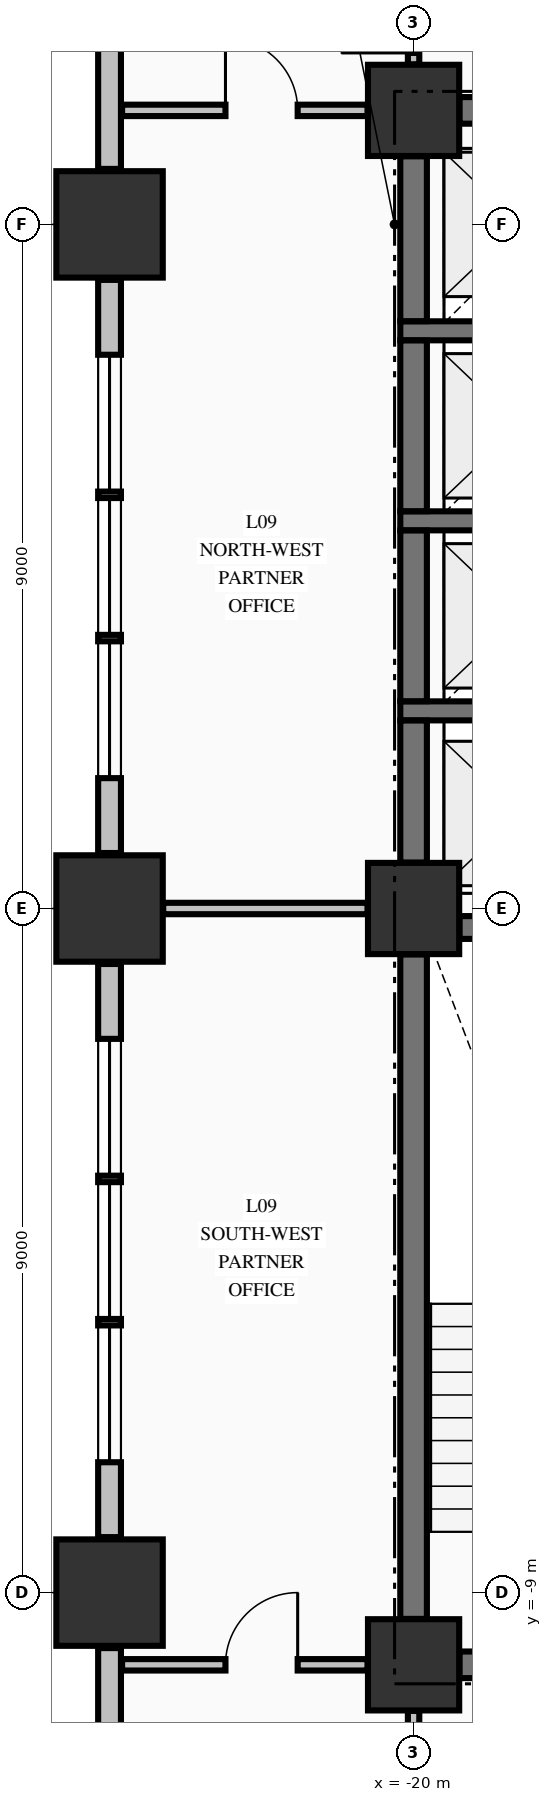
"""IFC4 building model, lengths in metres.
Left out: names, types, materials, properties, quantities, classifications, styles, units other than length and angle.
Written with IfcOpenShell. Run it as: python <this file> out.ifc"""

import sys

from ifc_helpers import new_model, si_unit, direction, frame, frame_2d, origin, origin_2d, place, context, subcontext, project, spatial, rectangle, extrude, element, fill, save


model = new_model("IFC4")
c1 = context("Model", 3, precision=1e-05, world=origin(), true_north=direction((0.0, 1.0)))
c2 = subcontext(c1, "Body", "Model", "MODEL_VIEW")
j1 = project(units=[si_unit("LENGTHUNIT", "METRE"), si_unit("PLANEANGLEUNIT", "RADIAN")], contexts=[c1])
p1 = place(None, origin())
s1 = spatial("IfcSite", under=j1, at=p1, CompositionType="ELEMENT")
p2 = place(p1, origin())
s2 = spatial("IfcBuilding", under=s1, at=p2, CompositionType="ELEMENT")
p3 = place(p2, frame((0.0, 0.0, 41.48)))
s3 = spatial("IfcBuildingStorey", under=s2, at=p3, CompositionType="ELEMENT", Elevation=41.48)
for number, where, z_axis, x_axis in (
    (1, (-24.0, -9.0, -0.25), (0.0, 0.0, 1.0), (1.0, 0.0, 0.0)),
    (2, (-24.0, 0.0, -0.25), (0.0, 0.0, 1.0), (1.0, 0.0, 0.0)),
    (3, (-24.0, 9.0, -0.25), (0.0, 0.0, 1.0), (1.0, 0.0, 0.0)),
):
    element("IfcColumn", number, at=place(p3, frame(where, z_axis=z_axis, x_axis=x_axis)), inside=s3, PredefinedType="COLUMN", context=c2, shape_type="SweptSolid", body=[
        extrude(rectangle(XDim=1.4, YDim=1.4, at=origin_2d()), origin(), (0.0, 0.0, 1.0), 3.57),
    ])
for number, where, z_axis, x_axis in (
    (4, (-20.0, -9.95, -0.25), (0.0, 0.0, 1.0), (1.0, 0.0, 0.0)),
    (5, (-20.0, 10.5, -0.25), (0.0, 0.0, 1.0), (1.0, 0.0, 0.0)),
    (6, (-20.0, 0.0, -0.25), (0.0, 0.0, 1.0), (1.0, 0.0, 0.0)),
):
    element("IfcColumn", number, at=place(p3, frame(where, z_axis=z_axis, x_axis=x_axis)), inside=s3, PredefinedType="COLUMN", context=c2, shape_type="SweptSolid", body=[
        extrude(rectangle(XDim=1.2, YDim=1.2, at=origin_2d()), origin(), (0.0, 0.0, 1.0), 3.57),
    ])
p4 = place(p3, frame((-24.0, -9.73, 0.0), z_axis=(0.0, 0.0, 1.0), x_axis=(0.0, -1.0, 0.0)))
e7 = element("IfcWall", 7, at=p4, inside=s3, PredefinedType="STANDARD", context=c2, shape_type="SweptSolid", body=[
    extrude(rectangle(XDim=12.54, YDim=0.3, at=frame_2d((6.27, 0.0))), origin(), (0.0, 0.0, 1.0), 2.712),
])
p5 = place(p3, frame((-24.0, -0.73, 0.0), z_axis=(0.0, 0.0, 1.0), x_axis=(0.0, -1.0, 0.0)))
e8 = element("IfcWall", 8, at=p5, inside=s3, PredefinedType="STANDARD", context=c2, shape_type="SweptSolid", body=[
    extrude(rectangle(XDim=7.54, YDim=0.3, at=frame_2d((3.77, 0.0))), origin(), (0.0, 0.0, 1.0), 2.712),
])
p6 = place(p5, frame((0.985, 0.0, 0.78)))
e9 = element("IfcOpeningElement", 9, at=p6, cuts=e8, PredefinedType="OPENING", context=c2, shape_type="SweptSolid", body=[
    extrude(rectangle(XDim=1.8, YDim=1.72, at=frame_2d((0.9, 0.86))), frame((0.0, 0.16, 0.0), z_axis=(0.0, -1.0, 0.0), x_axis=(1.0, 0.0, 0.0)), (0.0, 0.0, 1.0), 0.32),
])
p7 = place(p5, frame((2.87, 0.0, 0.78)))
e10 = element("IfcOpeningElement", 10, at=p7, cuts=e8, PredefinedType="OPENING", context=c2, shape_type="SweptSolid", body=[
    extrude(rectangle(XDim=1.8, YDim=1.72, at=frame_2d((0.9, 0.86))), frame((0.0, 0.16, 0.0), z_axis=(0.0, -1.0, 0.0), x_axis=(1.0, 0.0, 0.0)), (0.0, 0.0, 1.0), 0.32),
])
p8 = place(p5, frame((4.755, 0.0, 0.78)))
e11 = element("IfcOpeningElement", 11, at=p8, cuts=e8, PredefinedType="OPENING", context=c2, shape_type="SweptSolid", body=[
    extrude(rectangle(XDim=1.8, YDim=1.72, at=frame_2d((0.9, 0.86))), frame((0.0, 0.16, 0.0), z_axis=(0.0, -1.0, 0.0), x_axis=(1.0, 0.0, 0.0)), (0.0, 0.0, 1.0), 0.32),
])
p9 = place(p3, frame((-24.0, 8.27, 0.0), z_axis=(0.0, 0.0, 1.0), x_axis=(0.0, -1.0, 0.0)))
e12 = element("IfcWall", 12, at=p9, inside=s3, PredefinedType="STANDARD", context=c2, shape_type="SweptSolid", body=[
    extrude(rectangle(XDim=7.54, YDim=0.3, at=frame_2d((3.77, 0.0))), origin(), (0.0, 0.0, 1.0), 2.712),
])
p10 = place(p9, frame((0.985, 0.0, 0.78)))
e13 = element("IfcOpeningElement", 13, at=p10, cuts=e12, PredefinedType="OPENING", context=c2, shape_type="SweptSolid", body=[
    extrude(rectangle(XDim=1.8, YDim=1.72, at=frame_2d((0.9, 0.86))), frame((0.0, 0.16, 0.0), z_axis=(0.0, -1.0, 0.0), x_axis=(1.0, 0.0, 0.0)), (0.0, 0.0, 1.0), 0.32),
])
p11 = place(p9, frame((2.87, 0.0, 0.78)))
e14 = element("IfcOpeningElement", 14, at=p11, cuts=e12, PredefinedType="OPENING", context=c2, shape_type="SweptSolid", body=[
    extrude(rectangle(XDim=1.8, YDim=1.72, at=frame_2d((0.9, 0.86))), frame((0.0, 0.16, 0.0), z_axis=(0.0, -1.0, 0.0), x_axis=(1.0, 0.0, 0.0)), (0.0, 0.0, 1.0), 0.32),
])
p12 = place(p9, frame((4.755, 0.0, 0.78)))
e15 = element("IfcOpeningElement", 15, at=p12, cuts=e12, PredefinedType="OPENING", context=c2, shape_type="SweptSolid", body=[
    extrude(rectangle(XDim=1.8, YDim=1.72, at=frame_2d((0.9, 0.86))), frame((0.0, 0.16, 0.0), z_axis=(0.0, -1.0, 0.0), x_axis=(1.0, 0.0, 0.0)), (0.0, 0.0, 1.0), 0.32),
])
p13 = place(p3, frame((-24.0, 22.27, 0.0), z_axis=(0.0, 0.0, 1.0), x_axis=(0.0, -1.0, 0.0)))
e16 = element("IfcWall", 16, at=p13, inside=s3, PredefinedType="STANDARD", context=c2, shape_type="SweptSolid", body=[
    extrude(rectangle(XDim=12.54, YDim=0.3, at=frame_2d((6.27, 0.0))), origin(), (0.0, 0.0, 1.0), 2.712),
])
p14 = place(p3, frame((-19.396, -9.95, 0.0), z_axis=(0.0, 0.0, 1.0), x_axis=(1.0, 0.0, 0.0)))
e17 = element("IfcWall", 17, at=p14, inside=s3, PredefinedType="SHEAR", context=c2, shape_type="SweptSolid", body=[
    extrude(rectangle(XDim=4.696, YDim=0.35, at=frame_2d((2.348, 0.0))), origin(), (0.0, 0.0, 1.0), 3.32),
])
p15 = place(p14, frame((0.571, 0.0, 0.0)))
e18 = element("IfcOpeningElement", 18, at=p15, cuts=e17, PredefinedType="OPENING", context=c2, shape_type="SweptSolid", body=[
    extrude(rectangle(XDim=1.05, YDim=2.15, at=frame_2d((0.525, 1.075))), frame((0.0, 0.185, 0.0), z_axis=(0.0, -1.0, 0.0), x_axis=(1.0, 0.0, 0.0)), (0.0, 0.0, 1.0), 0.37),
])
p16 = place(p3, frame((-19.396, -0.25, 0.0), z_axis=(0.0, 0.0, 1.0), x_axis=(1.0, 0.0, 0.0)))
e19 = element("IfcWall", 19, at=p16, inside=s3, PredefinedType="SHEAR", context=c2, shape_type="SweptSolid", body=[
    extrude(rectangle(XDim=7.792, YDim=0.3, at=frame_2d((3.896, 0.0))), origin(), (0.0, 0.0, 1.0), 3.32),
])
p17 = place(p16, frame((5.696, 0.0, 0.0)))
e20 = element("IfcOpeningElement", 20, at=p17, cuts=e19, PredefinedType="OPENING", context=c2, shape_type="SweptSolid", body=[
    extrude(rectangle(XDim=1.1, YDim=2.15, at=frame_2d((0.55, 1.075))), frame((0.0, 0.16, 0.0), z_axis=(0.0, -1.0, 0.0), x_axis=(1.0, 0.0, 0.0)), (0.0, 0.0, 1.0), 0.32),
])
for number, where, z_axis, x_axis in (
    (21, (-20.175, 2.6, 0.0), (0.0, 0.0, 1.0), (1.0, 0.0, 0.0)),
    (22, (-20.175, 5.1, 0.0), (0.0, 0.0, 1.0), (1.0, 0.0, 0.0)),
    (23, (-20.175, 7.6, 0.0), (0.0, 0.0, 1.0), (1.0, 0.0, 0.0)),
):
    element("IfcWall", number, at=place(p3, frame(where, z_axis=z_axis, x_axis=x_axis)), inside=s3, PredefinedType="SOLIDWALL", context=c2, shape_type="SweptSolid", body=[
        extrude(rectangle(XDim=3.1, YDim=0.25, at=frame_2d((1.55, 0.0))), origin(), (0.0, 0.0, 1.0), 3.32),
    ])
p18 = place(p3, frame((-19.396, 10.5, 0.0), z_axis=(0.0, 0.0, 1.0), x_axis=(1.0, 0.0, 0.0)))
e24 = element("IfcWall", 24, at=p18, inside=s3, PredefinedType="SHEAR", context=c2, shape_type="SweptSolid", body=[
    extrude(rectangle(XDim=4.696, YDim=0.35, at=frame_2d((2.348, 0.0))), origin(), (0.0, 0.0, 1.0), 3.32),
])
p19 = place(p18, frame((2.796, 0.0, 0.0)))
e25 = element("IfcOpeningElement", 25, at=p19, cuts=e24, PredefinedType="OPENING", context=c2, shape_type="SweptSolid", body=[
    extrude(rectangle(XDim=1.2, YDim=2.15, at=frame_2d((0.6, 1.075))), frame((0.0, 0.185, 0.0), z_axis=(0.0, -1.0, 0.0), x_axis=(1.0, 0.0, 0.0)), (0.0, 0.0, 1.0), 0.37),
])
p20 = place(p3, frame((-23.835, -9.95, 0.0), z_axis=(0.0, 0.0, 1.0), x_axis=(1.0, 0.0, 0.0)))
e26 = element("IfcWall", 26, at=p20, inside=s3, PredefinedType="PARTITIONING", context=c2, shape_type="SweptSolid", body=[
    extrude(rectangle(XDim=3.229, YDim=0.15, at=frame_2d((1.615, 0.0))), origin(), (0.0, 0.0, 1.0), 3.32),
])
p21 = place(p20, frame((1.36, 0.0, 0.0)))
e27 = element("IfcOpeningElement", 27, at=p21, cuts=e26, PredefinedType="OPENING", context=c2, shape_type="SweptSolid", body=[
    extrude(rectangle(XDim=0.95, YDim=2.15, at=frame_2d((0.475, 1.075))), frame((0.0, 0.085, 0.0), z_axis=(0.0, -1.0, 0.0), x_axis=(1.0, 0.0, 0.0)), (0.0, 0.0, 1.0), 0.17),
])
p22 = place(p3, frame((-23.294, 0.0, 0.0), z_axis=(0.0, 0.0, 1.0), x_axis=(1.0, 0.0, 0.0)))
e28 = element("IfcWall", 28, at=p22, inside=s3, PredefinedType="PARTITIONING", context=c2, shape_type="SweptSolid", body=[
    extrude(rectangle(XDim=2.688, YDim=0.15, at=frame_2d((1.344, 0.0))), origin(), (0.0, 0.0, 1.0), 2.66),
])
p23 = place(p3, frame((-23.835, 10.5, 0.0), z_axis=(0.0, 0.0, 1.0), x_axis=(1.0, 0.0, 0.0)))
e29 = element("IfcWall", 29, at=p23, inside=s3, PredefinedType="PARTITIONING", context=c2, shape_type="SweptSolid", body=[
    extrude(rectangle(XDim=3.229, YDim=0.15, at=frame_2d((1.615, 0.0))), origin(), (0.0, 0.0, 1.0), 3.32),
])
p24 = place(p23, frame((1.36, 0.0, 0.0)))
e30 = element("IfcOpeningElement", 30, at=p24, cuts=e29, PredefinedType="OPENING", context=c2, shape_type="SweptSolid", body=[
    extrude(rectangle(XDim=0.95, YDim=2.15, at=frame_2d((0.475, 1.075))), frame((0.0, 0.085, 0.0), z_axis=(0.0, -1.0, 0.0), x_axis=(1.0, 0.0, 0.0)), (0.0, 0.0, 1.0), 0.17),
])
p25 = place(p3, frame((-20.0, -9.346, 0.0), z_axis=(0.0, 0.0, 1.0), x_axis=(0.0, 1.0, 0.0)))
e31 = element("IfcWall", 31, at=p25, inside=s3, PredefinedType="SHEAR", context=c2, shape_type="SweptSolid", body=[
    extrude(rectangle(XDim=8.742, YDim=0.35, at=frame_2d((4.371, 0.0))), origin(), (0.0, 0.0, 1.0), 3.32),
])
p26 = place(p3, frame((-20.0, 0.604, 0.0), z_axis=(0.0, 0.0, 1.0), x_axis=(0.0, 1.0, 0.0)))
e32 = element("IfcWall", 32, at=p26, inside=s3, PredefinedType="SHEAR", context=c2, shape_type="SweptSolid", body=[
    extrude(rectangle(XDim=1.869, YDim=0.35, at=frame_2d((0.935, 0.0))), origin(), (0.0, 0.0, 1.0), 3.32),
])
for number, where, z_axis, x_axis in (
    (33, (-20.0, 2.727, 0.0), (0.0, 0.0, 1.0), (0.0, 1.0, 0.0)),
    (34, (-20.0, 5.227, 0.0), (0.0, 0.0, 1.0), (0.0, 1.0, 0.0)),
):
    element("IfcWall", number, at=place(p3, frame(where, z_axis=z_axis, x_axis=x_axis)), inside=s3, PredefinedType="SHEAR", context=c2, shape_type="SweptSolid", body=[
        extrude(rectangle(XDim=2.246, YDim=0.35, at=frame_2d((1.123, 0.0))), origin(), (0.0, 0.0, 1.0), 3.32),
    ])
p27 = place(p3, frame((-20.0, 7.727, 0.0), z_axis=(0.0, 0.0, 1.0), x_axis=(0.0, 1.0, 0.0)))
e35 = element("IfcWall", 35, at=p27, inside=s3, PredefinedType="SHEAR", context=c2, shape_type="SweptSolid", body=[
    extrude(rectangle(XDim=2.169, YDim=0.35, at=frame_2d((1.084, 0.0))), origin(), (0.0, 0.0, 1.0), 3.32),
])
p28 = place(p3, frame((-20.0, -13.022, 0.0), z_axis=(0.0, 0.0, 1.0), x_axis=(0.0, 1.0, 0.0)))
e36 = element("IfcWall", 36, at=p28, inside=s3, PredefinedType="PARTITIONING", context=c2, shape_type="SweptSolid", body=[
    extrude(rectangle(XDim=2.466, YDim=0.15, at=frame_2d((1.233, 0.0))), origin(), (0.0, 0.0, 1.0), 3.32),
])
p29 = place(p28, frame((1.027, 0.0, 0.0)))
e37 = element("IfcOpeningElement", 37, at=p29, cuts=e36, PredefinedType="OPENING", context=c2, shape_type="SweptSolid", body=[
    extrude(rectangle(XDim=0.95, YDim=2.15, at=frame_2d((0.475, 1.075))), frame((0.0, 0.085, 0.0), z_axis=(0.0, -1.0, 0.0), x_axis=(1.0, 0.0, 0.0)), (0.0, 0.0, 1.0), 0.17),
])
p30 = place(p3, frame((-20.0, 11.106, 0.0), z_axis=(0.0, 0.0, 1.0), x_axis=(0.0, 1.0, 0.0)))
e38 = element("IfcWall", 38, at=p30, inside=s3, PredefinedType="PARTITIONING", context=c2, shape_type="SweptSolid", body=[
    extrude(rectangle(XDim=1.766, YDim=0.15, at=frame_2d((0.883, 0.0))), origin(), (0.0, 0.0, 1.0), 3.32),
])
p31 = place(p30, frame((0.15, 0.0, 0.0)))
e39 = element("IfcOpeningElement", 39, at=p31, cuts=e38, PredefinedType="OPENING", context=c2, shape_type="SweptSolid", body=[
    extrude(rectangle(XDim=0.95, YDim=2.15, at=frame_2d((0.475, 1.075))), frame((0.0, 0.085, 0.0), z_axis=(0.0, -1.0, 0.0), x_axis=(1.0, 0.0, 0.0)), (0.0, 0.0, 1.0), 0.17),
])
p32 = place(p6, origin())
e40 = element("IfcWindow", 40, at=p32, inside=s3, PartitioningType="SINGLE_PANEL", PredefinedType="WINDOW", context=c2, shape_type="SweptSolid", body=[
    extrude(rectangle(XDim=1.8, YDim=1.72, at=frame_2d((0.9, 0.86))), frame((0.0, 0.03, 0.0), z_axis=(0.0, -1.0, 0.0), x_axis=(1.0, 0.0, 0.0)), (0.0, 0.0, 1.0), 0.06),
])
fill(e9, e40)
p33 = place(p7, origin())
e41 = element("IfcWindow", 41, at=p33, inside=s3, PartitioningType="SINGLE_PANEL", PredefinedType="WINDOW", context=c2, shape_type="SweptSolid", body=[
    extrude(rectangle(XDim=1.8, YDim=1.72, at=frame_2d((0.9, 0.86))), frame((0.0, 0.03, 0.0), z_axis=(0.0, -1.0, 0.0), x_axis=(1.0, 0.0, 0.0)), (0.0, 0.0, 1.0), 0.06),
])
fill(e10, e41)
p34 = place(p8, origin())
e42 = element("IfcWindow", 42, at=p34, inside=s3, PartitioningType="SINGLE_PANEL", PredefinedType="WINDOW", context=c2, shape_type="SweptSolid", body=[
    extrude(rectangle(XDim=1.8, YDim=1.72, at=frame_2d((0.9, 0.86))), frame((0.0, 0.03, 0.0), z_axis=(0.0, -1.0, 0.0), x_axis=(1.0, 0.0, 0.0)), (0.0, 0.0, 1.0), 0.06),
])
fill(e11, e42)
p35 = place(p10, origin())
e43 = element("IfcWindow", 43, at=p35, inside=s3, PartitioningType="SINGLE_PANEL", PredefinedType="WINDOW", context=c2, shape_type="SweptSolid", body=[
    extrude(rectangle(XDim=1.8, YDim=1.72, at=frame_2d((0.9, 0.86))), frame((0.0, 0.03, 0.0), z_axis=(0.0, -1.0, 0.0), x_axis=(1.0, 0.0, 0.0)), (0.0, 0.0, 1.0), 0.06),
])
fill(e13, e43)
p36 = place(p11, origin())
e44 = element("IfcWindow", 44, at=p36, inside=s3, PartitioningType="SINGLE_PANEL", PredefinedType="WINDOW", context=c2, shape_type="SweptSolid", body=[
    extrude(rectangle(XDim=1.8, YDim=1.72, at=frame_2d((0.9, 0.86))), frame((0.0, 0.03, 0.0), z_axis=(0.0, -1.0, 0.0), x_axis=(1.0, 0.0, 0.0)), (0.0, 0.0, 1.0), 0.06),
])
fill(e14, e44)
p37 = place(p12, origin())
e45 = element("IfcWindow", 45, at=p37, inside=s3, PartitioningType="SINGLE_PANEL", PredefinedType="WINDOW", context=c2, shape_type="SweptSolid", body=[
    extrude(rectangle(XDim=1.8, YDim=1.72, at=frame_2d((0.9, 0.86))), frame((0.0, 0.03, 0.0), z_axis=(0.0, -1.0, 0.0), x_axis=(1.0, 0.0, 0.0)), (0.0, 0.0, 1.0), 0.06),
])
fill(e15, e45)
p38 = place(p31, origin())
e46 = element("IfcDoor", 46, at=p38, inside=s3, OperationType="SINGLE_SWING_LEFT", PredefinedType="DOOR", context=c2, shape_type="SweptSolid", body=[
    extrude(rectangle(XDim=0.95, YDim=2.15, at=frame_2d((0.475, 1.075))), frame((0.0, 0.025, 0.0), z_axis=(0.0, -1.0, 0.0), x_axis=(1.0, 0.0, 0.0)), (0.0, 0.0, 1.0), 0.05),
])
fill(e39, e46)
p39 = place(p24, origin())
e47 = element("IfcDoor", 47, at=p39, inside=s3, OperationType="SINGLE_SWING_LEFT", PredefinedType="DOOR", context=c2, shape_type="SweptSolid", body=[
    extrude(rectangle(XDim=0.95, YDim=2.15, at=frame_2d((0.475, 1.075))), frame((0.0, 0.025, 0.0), z_axis=(0.0, -1.0, 0.0), x_axis=(1.0, 0.0, 0.0)), (0.0, 0.0, 1.0), 0.05),
])
fill(e30, e47)
p40 = place(p21, origin())
e48 = element("IfcDoor", 48, at=p40, inside=s3, OperationType="SINGLE_SWING_RIGHT", PredefinedType="DOOR", context=c2, shape_type="SweptSolid", body=[
    extrude(rectangle(XDim=0.95, YDim=2.15, at=frame_2d((0.475, 1.075))), frame((0.0, 0.025, 0.0), z_axis=(0.0, -1.0, 0.0), x_axis=(1.0, 0.0, 0.0)), (0.0, 0.0, 1.0), 0.05),
])
fill(e27, e48)
save(model, sys.argv[1])
